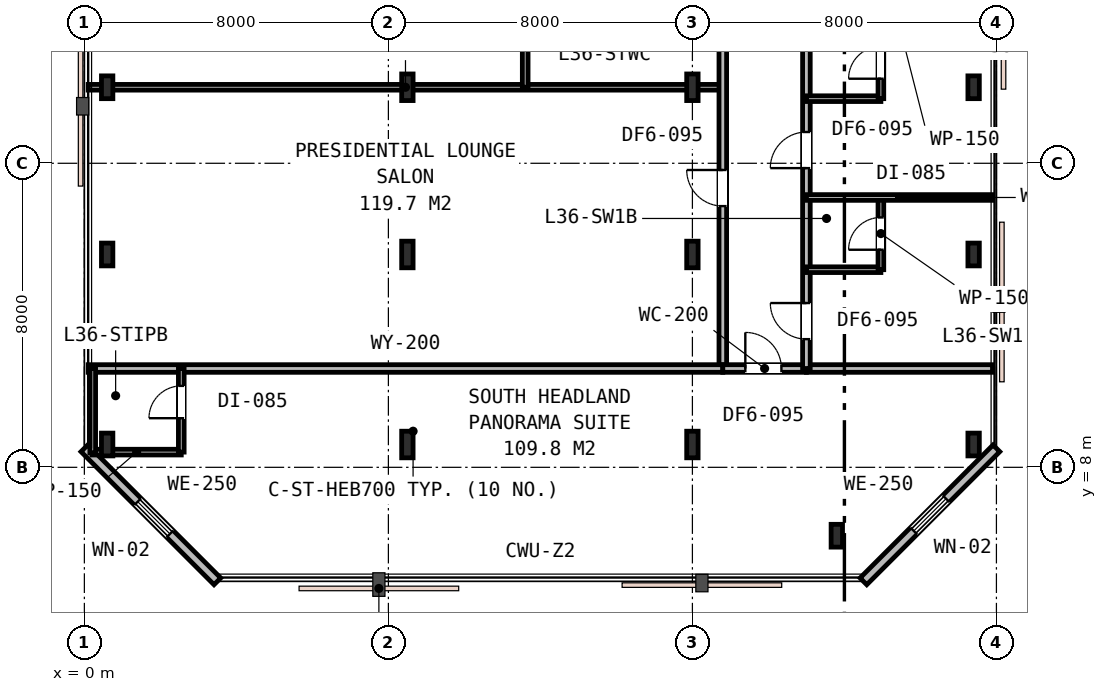
"""IFC4 building model, lengths in metres.
Left out: names, types, materials, properties, quantities, classifications, styles, units other than length and angle.
Written with IfcOpenShell. Run it as: python <this file> out.ifc"""

import sys

from ifc_helpers import new_model, si_unit, direction, frame, frame_2d, origin, origin_2d, place, context, subcontext, project, spatial, rectangle, i_section, extrude, element, fill, save


model = new_model("IFC4")
c1 = context("Model", 3, precision=1e-05, world=origin(), true_north=direction((0.0, 1.0)))
c2 = subcontext(c1, "Body", "Model", "MODEL_VIEW")
j1 = project(units=[si_unit("LENGTHUNIT", "METRE"), si_unit("PLANEANGLEUNIT", "RADIAN")], contexts=[c1])
p1 = place(None, origin())
s1 = spatial("IfcSite", under=j1, at=p1, CompositionType="ELEMENT")
p2 = place(p1, origin())
s2 = spatial("IfcBuilding", under=s1, at=p2, CompositionType="ELEMENT")
p3 = place(p2, frame((0.0, 0.0, 140.4)))
s3 = spatial("IfcBuildingStorey", under=s2, at=p3, CompositionType="ELEMENT", Elevation=140.4)
for number, where, z_axis, x_axis in (
    (1, (0.6, 8.6, 0.0), (0.0, 0.0, 1.0), (1.0, 0.0, 0.0)),
    (2, (0.6, 13.6, 0.0), (0.0, 0.0, 1.0), (1.0, 0.0, 0.0)),
    (3, (0.6, 18.0, 0.0), (0.0, 0.0, 1.0), (1.0, 0.0, 0.0)),
    (4, (19.8, 6.2, 0.0), (0.0, 0.0, 1.0), (1.0, 0.0, 0.0)),
    (5, (23.4, 8.6, 0.0), (0.0, 0.0, 1.0), (1.0, 0.0, 0.0)),
    (6, (23.4, 13.6, 0.0), (0.0, 0.0, 1.0), (1.0, 0.0, 0.0)),
    (7, (23.4, 18.0, 0.0), (0.0, 0.0, 1.0), (1.0, 0.0, 0.0)),
):
    element("IfcColumn", number, at=place(p3, frame(where, z_axis=z_axis, x_axis=x_axis)), inside=s3, PredefinedType="COLUMN", context=c2, shape_type="SweptSolid", body=[
        extrude(i_section(OverallWidth=0.3, OverallDepth=0.6, WebThickness=0.015, FlangeThickness=0.03, FilletRadius=0.027, at=origin_2d()), origin(), (0.0, 0.0, 1.0), 3.6),
    ])
for number, where, z_axis, x_axis in (
    (8, (8.5, 8.6, 0.0), (0.0, 0.0, 1.0), (1.0, 0.0, 0.0)),
    (9, (16.0, 8.6, 0.0), (0.0, 0.0, 1.0), (1.0, 0.0, 0.0)),
    (10, (8.5, 13.6, 0.0), (0.0, 0.0, 1.0), (1.0, 0.0, 0.0)),
    (11, (16.0, 13.6, 0.0), (0.0, 0.0, 1.0), (1.0, 0.0, 0.0)),
    (12, (8.5, 18.0, 0.0), (0.0, 0.0, 1.0), (1.0, 0.0, 0.0)),
    (13, (16.0, 18.0, 0.0), (0.0, 0.0, 1.0), (1.0, 0.0, 0.0)),
):
    element("IfcColumn", number, at=place(p3, frame(where, z_axis=z_axis, x_axis=x_axis)), inside=s3, PredefinedType="COLUMN", context=c2, shape_type="SweptSolid", body=[
        extrude(i_section(OverallWidth=0.3, OverallDepth=0.7, WebThickness=0.017, FlangeThickness=0.032, FilletRadius=0.027, at=origin_2d()), origin(), (0.0, 0.0, 1.0), 3.6),
    ])
p4 = place(p3, frame((20.5, 5.0, 0.0), z_axis=(0.0, 0.0, 1.0), x_axis=(0.707106781187, 0.707106781187, 0.0)))
e14 = element("IfcWall", 14, at=p4, inside=s3, PredefinedType="STANDARD", context=c2, shape_type="SweptSolid", body=[
    extrude(rectangle(XDim=4.95, YDim=0.25, at=frame_2d((2.475, 0.0))), origin(), (0.0, 0.0, 1.0), 3.24),
])
p5 = place(p4, frame((1.875, 0.0, 0.85)))
e15 = element("IfcOpeningElement", 15, at=p5, cuts=e14, PredefinedType="OPENING", context=c2, shape_type="SweptSolid", body=[
    extrude(rectangle(XDim=1.2, YDim=1.6, at=frame_2d((0.6, 0.8))), frame((0.0, 0.135, 0.0), z_axis=(0.0, -1.0, 0.0), x_axis=(1.0, 0.0, 0.0)), (0.0, 0.0, 1.0), 0.27),
])
p6 = place(p3, frame((0.0, 8.5, 0.0), z_axis=(0.0, 0.0, 1.0), x_axis=(0.707106781187, -0.707106781187, 0.0)))
e16 = element("IfcWall", 16, at=p6, inside=s3, PredefinedType="STANDARD", context=c2, shape_type="SweptSolid", body=[
    extrude(rectangle(XDim=4.95, YDim=0.25, at=frame_2d((2.475, 0.0))), origin(), (0.0, 0.0, 1.0), 3.24),
])
p7 = place(p6, frame((1.985, 0.0, 0.85)))
e17 = element("IfcOpeningElement", 17, at=p7, cuts=e16, PredefinedType="OPENING", context=c2, shape_type="SweptSolid", body=[
    extrude(rectangle(XDim=1.2, YDim=1.6, at=frame_2d((0.6, 0.8))), frame((0.0, 0.135, 0.0), z_axis=(0.0, -1.0, 0.0), x_axis=(1.0, 0.0, 0.0)), (0.0, 0.0, 1.0), 0.27),
])
p8 = place(p3, frame((0.1, 18.0, 0.0), z_axis=(0.0, 0.0, 1.0), x_axis=(1.0, 0.0, 0.0)))
e18 = element("IfcWall", 18, at=p8, inside=s3, PredefinedType="PARTITIONING", context=c2, shape_type="SweptSolid", body=[
    extrude(rectangle(XDim=16.7, YDim=0.15, at=frame_2d((8.35, 0.0))), origin(), (0.0, 0.0, 1.0), 2.84),
])
p9 = place(p3, frame((11.6, 18.0, 0.0), z_axis=(0.0, 0.0, 1.0), x_axis=(0.0, 1.0, 0.0)))
e19 = element("IfcWall", 19, at=p9, inside=s3, PredefinedType="PARTITIONING", context=c2, shape_type="SweptSolid", body=[
    extrude(rectangle(XDim=3.0, YDim=0.15, at=frame_2d((1.5, 0.0))), origin(), (0.0, 0.0, 1.0), 2.84),
])
p10 = place(p3, frame((16.8, 10.6, 0.0), z_axis=(0.0, 0.0, 1.0), x_axis=(0.0, 1.0, 0.0)))
e20 = element("IfcWall", 20, at=p10, inside=s3, PredefinedType="PARTITIONING", context=c2, shape_type="SweptSolid", body=[
    extrude(rectangle(XDim=18.0, YDim=0.2, at=frame_2d((9.0, 0.0))), origin(), (0.0, 0.0, 1.0), 2.84),
])
p11 = place(p10, frame((8.679, 0.0, 0.0)))
e21 = element("IfcOpeningElement", 21, at=p11, cuts=e20, PredefinedType="OPENING", context=c2, shape_type="SweptSolid", body=[
    extrude(rectangle(XDim=0.95, YDim=2.15, at=frame_2d((0.475, 1.075))), frame((0.0, 0.11, 0.0), z_axis=(0.0, -1.0, 0.0), x_axis=(1.0, 0.0, 0.0)), (0.0, 0.0, 1.0), 0.22),
])
p12 = place(p10, frame((15.399, 0.0, 0.0)))
e22 = element("IfcOpeningElement", 22, at=p12, cuts=e20, PredefinedType="OPENING", context=c2, shape_type="SweptSolid", body=[
    extrude(rectangle(XDim=0.95, YDim=2.15, at=frame_2d((0.475, 1.075))), frame((0.0, 0.11, 0.0), z_axis=(0.0, -1.0, 0.0), x_axis=(1.0, 0.0, 0.0)), (0.0, 0.0, 1.0), 0.22),
])
p13 = place(p10, frame((4.273, 0.0, 0.0)))
e23 = element("IfcOpeningElement", 23, at=p13, cuts=e20, PredefinedType="OPENING", context=c2, shape_type="SweptSolid", body=[
    extrude(rectangle(XDim=0.95, YDim=2.15, at=frame_2d((0.475, 1.075))), frame((0.0, 0.11, 0.0), z_axis=(0.0, -1.0, 0.0), x_axis=(1.0, 0.0, 0.0)), (0.0, 0.0, 1.0), 0.22),
])
p14 = place(p3, frame((0.1, 10.6, 0.0), z_axis=(0.0, 0.0, 1.0), x_axis=(1.0, 0.0, 0.0)))
e24 = element("IfcWall", 24, at=p14, inside=s3, PredefinedType="PARTITIONING", context=c2, shape_type="SweptSolid", body=[
    extrude(rectangle(XDim=16.7, YDim=0.2, at=frame_2d((8.35, 0.0))), origin(), (0.0, 0.0, 1.0), 2.84),
])
p15 = place(p3, frame((19.0, 10.6, 0.0), z_axis=(0.0, 0.0, 1.0), x_axis=(1.0, 0.0, 0.0)))
e25 = element("IfcWall", 25, at=p15, inside=s3, PredefinedType="PARTITIONING", context=c2, shape_type="SweptSolid", body=[
    extrude(rectangle(XDim=4.9, YDim=0.2, at=frame_2d((2.45, 0.0))), origin(), (0.0, 0.0, 1.0), 2.87),
])
p16 = place(p3, frame((16.8, 10.6, 0.0), z_axis=(0.0, 0.0, 1.0), x_axis=(1.0, 0.0, 0.0)))
e26 = element("IfcWall", 26, at=p16, inside=s3, PredefinedType="PARTITIONING", context=c2, shape_type="SweptSolid", body=[
    extrude(rectangle(XDim=2.2, YDim=0.2, at=frame_2d((1.1, 0.0))), origin(), (0.0, 0.0, 1.0), 2.87),
])
p17 = place(p16, frame((0.593, 0.0, 0.0)))
e27 = element("IfcOpeningElement", 27, at=p17, cuts=e26, PredefinedType="OPENING", context=c2, shape_type="SweptSolid", body=[
    extrude(rectangle(XDim=0.95, YDim=2.15, at=frame_2d((0.475, 1.075))), frame((0.0, 0.11, 0.0), z_axis=(0.0, -1.0, 0.0), x_axis=(1.0, 0.0, 0.0)), (0.0, 0.0, 1.0), 0.22),
])
p18 = place(p3, frame((0.2, 8.4, 0.0), z_axis=(0.0, 0.0, 1.0), x_axis=(1.0, 0.0, 0.0)))
e28 = element("IfcWall", 28, at=p18, inside=s3, PredefinedType="PARTITIONING", context=c2, shape_type="SweptSolid", body=[
    extrude(rectangle(XDim=2.35, YDim=0.15, at=frame_2d((1.175, 0.0))), origin(), (0.0, 0.0, 1.0), 2.84),
])
p19 = place(p3, frame((2.55, 8.4, 0.0), z_axis=(0.0, 0.0, 1.0), x_axis=(0.0, 1.0, 0.0)))
e29 = element("IfcWall", 29, at=p19, inside=s3, PredefinedType="PARTITIONING", context=c2, shape_type="SweptSolid", body=[
    extrude(rectangle(XDim=2.2, YDim=0.15, at=frame_2d((1.1, 0.0))), origin(), (0.0, 0.0, 1.0), 2.84),
])
p20 = place(p19, frame((0.892, 0.0, 0.0)))
e30 = element("IfcOpeningElement", 30, at=p20, cuts=e29, PredefinedType="OPENING", context=c2, shape_type="SweptSolid", body=[
    extrude(rectangle(XDim=0.85, YDim=2.15, at=frame_2d((0.425, 1.075))), frame((0.0, 0.085, 0.0), z_axis=(0.0, -1.0, 0.0), x_axis=(1.0, 0.0, 0.0)), (0.0, 0.0, 1.0), 0.17),
])
p21 = place(p3, frame((0.22, 8.38, 0.0), z_axis=(0.0, 0.0, 1.0), x_axis=(0.0, 1.0, 0.0)))
e31 = element("IfcWall", 31, at=p21, inside=s3, PredefinedType="PARTITIONING", context=c2, shape_type="SweptSolid", body=[
    extrude(rectangle(XDim=2.22, YDim=0.15, at=frame_2d((1.11, 0.0))), origin(), (0.0, 0.0, 1.0), 2.84),
])
p22 = place(p3, frame((19.0, 10.6, 0.0), z_axis=(0.0, 0.0, 1.0), x_axis=(0.0, 1.0, 0.0)))
e32 = element("IfcWall", 32, at=p22, inside=s3, PredefinedType="PARTITIONING", context=c2, shape_type="SweptSolid", body=[
    extrude(rectangle(XDim=18.0, YDim=0.2, at=frame_2d((9.0, 0.0))), origin(), (0.0, 0.0, 1.0), 2.84),
])
p23 = place(p22, frame((0.772, 0.0, 0.0)))
e33 = element("IfcOpeningElement", 33, at=p23, cuts=e32, PredefinedType="OPENING", context=c2, shape_type="SweptSolid", body=[
    extrude(rectangle(XDim=0.95, YDim=2.15, at=frame_2d((0.475, 1.075))), frame((0.0, 0.11, 0.0), z_axis=(0.0, -1.0, 0.0), x_axis=(1.0, 0.0, 0.0)), (0.0, 0.0, 1.0), 0.22),
])
p24 = place(p22, frame((5.272, 0.0, 0.0)))
e34 = element("IfcOpeningElement", 34, at=p24, cuts=e32, PredefinedType="OPENING", context=c2, shape_type="SweptSolid", body=[
    extrude(rectangle(XDim=0.95, YDim=2.15, at=frame_2d((0.475, 1.075))), frame((0.0, 0.11, 0.0), z_axis=(0.0, -1.0, 0.0), x_axis=(1.0, 0.0, 0.0)), (0.0, 0.0, 1.0), 0.22),
])
p25 = place(p22, frame((9.773, 0.0, 0.0)))
e35 = element("IfcOpeningElement", 35, at=p25, cuts=e32, PredefinedType="OPENING", context=c2, shape_type="SweptSolid", body=[
    extrude(rectangle(XDim=0.95, YDim=2.15, at=frame_2d((0.475, 1.075))), frame((0.0, 0.11, 0.0), z_axis=(0.0, -1.0, 0.0), x_axis=(1.0, 0.0, 0.0)), (0.0, 0.0, 1.0), 0.22),
])
p26 = place(p22, frame((15.275, 0.0, 0.0)))
e36 = element("IfcOpeningElement", 36, at=p26, cuts=e32, PredefinedType="OPENING", context=c2, shape_type="SweptSolid", body=[
    extrude(rectangle(XDim=0.95, YDim=2.15, at=frame_2d((0.475, 1.075))), frame((0.0, 0.11, 0.0), z_axis=(0.0, -1.0, 0.0), x_axis=(1.0, 0.0, 0.0)), (0.0, 0.0, 1.0), 0.22),
])
p27 = place(p3, frame((19.0, 13.2, 0.0), z_axis=(0.0, 0.0, 1.0), x_axis=(1.0, 0.0, 0.0)))
e37 = element("IfcWall", 37, at=p27, inside=s3, PredefinedType="PARTITIONING", context=c2, shape_type="SweptSolid", body=[
    extrude(rectangle(XDim=1.96, YDim=0.15, at=frame_2d((0.98, 0.0))), origin(), (0.0, 0.0, 1.0), 2.84),
])
p28 = place(p3, frame((20.96, 13.2, 0.0), z_axis=(0.0, 0.0, 1.0), x_axis=(0.0, 1.0, 0.0)))
e38 = element("IfcWall", 38, at=p28, inside=s3, PredefinedType="PARTITIONING", context=c2, shape_type="SweptSolid", body=[
    extrude(rectangle(XDim=1.9, YDim=0.15, at=frame_2d((0.95, 0.0))), origin(), (0.0, 0.0, 1.0), 2.84),
])
p29 = place(p28, frame((0.525, 0.0, 0.0)))
e39 = element("IfcOpeningElement", 39, at=p29, cuts=e38, PredefinedType="OPENING", context=c2, shape_type="SweptSolid", body=[
    extrude(rectangle(XDim=0.85, YDim=2.15, at=frame_2d((0.425, 1.075))), frame((0.0, 0.085, 0.0), z_axis=(0.0, -1.0, 0.0), x_axis=(1.0, 0.0, 0.0)), (0.0, 0.0, 1.0), 0.17),
])
p30 = place(p3, frame((19.0, 15.1, 0.0), z_axis=(0.0, 0.0, 1.0), x_axis=(1.0, 0.0, 0.0)))
e40 = element("IfcWall", 40, at=p30, inside=s3, PredefinedType="PARTITIONING", context=c2, shape_type="SweptSolid", body=[
    extrude(rectangle(XDim=4.9, YDim=0.15, at=frame_2d((2.45, 0.0))), origin(), (0.0, 0.0, 1.0), 2.87),
])
p31 = place(p3, frame((19.0, 17.7, 0.0), z_axis=(0.0, 0.0, 1.0), x_axis=(1.0, 0.0, 0.0)))
e41 = element("IfcWall", 41, at=p31, inside=s3, PredefinedType="PARTITIONING", context=c2, shape_type="SweptSolid", body=[
    extrude(rectangle(XDim=1.96, YDim=0.15, at=frame_2d((0.98, 0.0))), origin(), (0.0, 0.0, 1.0), 2.84),
])
p32 = place(p3, frame((20.96, 17.7, 0.0), z_axis=(0.0, 0.0, 1.0), x_axis=(0.0, 1.0, 0.0)))
e42 = element("IfcWall", 42, at=p32, inside=s3, PredefinedType="PARTITIONING", context=c2, shape_type="SweptSolid", body=[
    extrude(rectangle(XDim=1.9, YDim=0.15, at=frame_2d((0.95, 0.0))), origin(), (0.0, 0.0, 1.0), 2.84),
])
p33 = place(p32, frame((0.525, 0.0, 0.0)))
e43 = element("IfcOpeningElement", 43, at=p33, cuts=e42, PredefinedType="OPENING", context=c2, shape_type="SweptSolid", body=[
    extrude(rectangle(XDim=0.85, YDim=2.15, at=frame_2d((0.425, 1.075))), frame((0.0, 0.085, 0.0), z_axis=(0.0, -1.0, 0.0), x_axis=(1.0, 0.0, 0.0)), (0.0, 0.0, 1.0), 0.17),
])
p34 = place(p5, origin())
e44 = element("IfcWindow", 44, at=p34, inside=s3, PartitioningType="SINGLE_PANEL", PredefinedType="WINDOW", context=c2, shape_type="SweptSolid", body=[
    extrude(rectangle(XDim=1.2, YDim=1.6, at=frame_2d((0.6, 0.8))), frame((0.0, 0.03, 0.0), z_axis=(0.0, -1.0, 0.0), x_axis=(1.0, 0.0, 0.0)), (0.0, 0.0, 1.0), 0.06),
])
fill(e15, e44)
p35 = place(p7, origin())
e45 = element("IfcWindow", 45, at=p35, inside=s3, PartitioningType="SINGLE_PANEL", PredefinedType="WINDOW", context=c2, shape_type="SweptSolid", body=[
    extrude(rectangle(XDim=1.2, YDim=1.6, at=frame_2d((0.6, 0.8))), frame((0.0, 0.03, 0.0), z_axis=(0.0, -1.0, 0.0), x_axis=(1.0, 0.0, 0.0)), (0.0, 0.0, 1.0), 0.06),
])
fill(e17, e45)
p36 = place(p13, origin())
e46 = element("IfcDoor", 46, at=p36, inside=s3, OperationType="SINGLE_SWING_RIGHT", PredefinedType="DOOR", context=c2, shape_type="SweptSolid", body=[
    extrude(rectangle(XDim=0.95, YDim=2.15, at=frame_2d((0.475, 1.075))), frame((0.0, 0.025, 0.0), z_axis=(0.0, -1.0, 0.0), x_axis=(1.0, 0.0, 0.0)), (0.0, 0.0, 1.0), 0.05),
])
fill(e23, e46)
p37 = place(p17, origin())
e47 = element("IfcDoor", 47, at=p37, inside=s3, OperationType="SINGLE_SWING_LEFT", PredefinedType="DOOR", context=c2, shape_type="SweptSolid", body=[
    extrude(rectangle(XDim=0.95, YDim=2.15, at=frame_2d((0.475, 1.075))), frame((0.0, 0.025, 0.0), z_axis=(0.0, -1.0, 0.0), x_axis=(1.0, 0.0, 0.0)), (0.0, 0.0, 1.0), 0.05),
])
fill(e27, e47)
p38 = place(p20, origin())
e48 = element("IfcDoor", 48, at=p38, inside=s3, OperationType="SINGLE_SWING_LEFT", PredefinedType="DOOR", context=c2, shape_type="SweptSolid", body=[
    extrude(rectangle(XDim=0.85, YDim=2.15, at=frame_2d((0.425, 1.075))), frame((0.0, 0.025, 0.0), z_axis=(0.0, -1.0, 0.0), x_axis=(1.0, 0.0, 0.0)), (0.0, 0.0, 1.0), 0.05),
])
fill(e30, e48)
p39 = place(p23, origin())
e49 = element("IfcDoor", 49, at=p39, inside=s3, OperationType="SINGLE_SWING_RIGHT", PredefinedType="DOOR", context=c2, shape_type="SweptSolid", body=[
    extrude(rectangle(XDim=0.95, YDim=2.15, at=frame_2d((0.475, 1.075))), frame((0.0, 0.025, 0.0), z_axis=(0.0, -1.0, 0.0), x_axis=(1.0, 0.0, 0.0)), (0.0, 0.0, 1.0), 0.05),
])
fill(e33, e49)
p40 = place(p29, origin())
e50 = element("IfcDoor", 50, at=p40, inside=s3, OperationType="SINGLE_SWING_LEFT", PredefinedType="DOOR", context=c2, shape_type="SweptSolid", body=[
    extrude(rectangle(XDim=0.85, YDim=2.15, at=frame_2d((0.425, 1.075))), frame((0.0, 0.025, 0.0), z_axis=(0.0, -1.0, 0.0), x_axis=(1.0, 0.0, 0.0)), (0.0, 0.0, 1.0), 0.05),
])
fill(e39, e50)
p41 = place(p24, origin())
e51 = element("IfcDoor", 51, at=p41, inside=s3, OperationType="SINGLE_SWING_LEFT", PredefinedType="DOOR", context=c2, shape_type="SweptSolid", body=[
    extrude(rectangle(XDim=0.95, YDim=2.15, at=frame_2d((0.475, 1.075))), frame((0.0, 0.025, 0.0), z_axis=(0.0, -1.0, 0.0), x_axis=(1.0, 0.0, 0.0)), (0.0, 0.0, 1.0), 0.05),
])
fill(e34, e51)
p42 = place(p33, origin())
e52 = element("IfcDoor", 52, at=p42, inside=s3, OperationType="SINGLE_SWING_LEFT", PredefinedType="DOOR", context=c2, shape_type="SweptSolid", body=[
    extrude(rectangle(XDim=0.85, YDim=2.15, at=frame_2d((0.425, 1.075))), frame((0.0, 0.025, 0.0), z_axis=(0.0, -1.0, 0.0), x_axis=(1.0, 0.0, 0.0)), (0.0, 0.0, 1.0), 0.05),
])
fill(e43, e52)
save(model, sys.argv[1])
